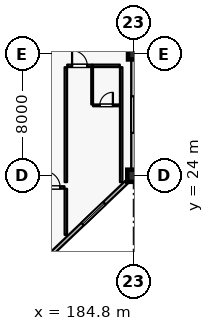
"""IFC4 building model, lengths in metres.
Left out: names, types, materials, properties, quantities, classifications, styles, units other than length and angle.
Written with IfcOpenShell. Run it as: python <this file> out.ifc"""

import sys

from ifc_helpers import new_model, si_unit, direction, frame, frame_2d, origin, origin_2d, place, context, subcontext, project, spatial, rectangle, extrude, element, fill, save


model = new_model("IFC4")
c1 = context("Model", 3, precision=1e-05, world=origin(), true_north=direction((0.0, 1.0)))
c2 = subcontext(c1, "Body", "Model", "MODEL_VIEW")
j1 = project(units=[si_unit("LENGTHUNIT", "METRE"), si_unit("PLANEANGLEUNIT", "RADIAN")], contexts=[c1])
p1 = place(None, origin())
s1 = spatial("IfcSite", under=j1, at=p1, CompositionType="ELEMENT")
p2 = place(p1, origin())
s2 = spatial("IfcBuilding", under=s1, at=p2, CompositionType="ELEMENT")
p3 = place(p2, frame((0.0, 0.0, 11.4)))
s3 = spatial("IfcBuildingStorey", under=s2, at=p3, CompositionType="ELEMENT", Elevation=11.4)
p4 = place(p3, frame((184.8, 24.0, 0.0), z_axis=(0.0, 0.0, 1.0), x_axis=(1.0, 0.0, 0.0)))
e1 = element("IfcColumn", 1, at=p4, inside=s3, PredefinedType="COLUMN", context=c2, shape_type="SweptSolid", body=[
    extrude(rectangle(XDim=0.8, YDim=0.8, at=origin_2d()), origin(), (0.0, 0.0, 1.0), 4.8),
])
p5 = place(p3, frame((184.8, 32.0, 0.0), z_axis=(0.0, 0.0, 1.0), x_axis=(1.0, 0.0, 0.0)))
e2 = element("IfcColumn", 2, at=p5, inside=s3, PredefinedType="COLUMN", context=c2, shape_type="SweptSolid", body=[
    extrude(rectangle(XDim=0.7, YDim=0.7, at=origin_2d()), origin(), (0.0, 0.0, 1.0), 4.8),
])
p6 = place(p3, frame((184.4, 23.619, 0.0), z_axis=(0.0, 0.0, 1.0), x_axis=(-0.724145676014, -0.689647040094, 0.0)))
e3 = element("IfcWall", 3, at=p6, inside=s3, PredefinedType="SOLIDWALL", context=c2, shape_type="SweptSolid", body=[
    extrude(rectangle(XDim=10.495, YDim=0.24, at=frame_2d((5.248, 0.0))), origin(), (0.0, 0.0, 1.0), 4.13),
])
p7 = place(p6, frame((2.066, 0.0, 0.8)))
e4 = element("IfcOpeningElement", 4, at=p7, cuts=e3, PredefinedType="OPENING", context=c2, shape_type="SweptSolid", body=[
    extrude(rectangle(XDim=2.0, YDim=1.75, at=frame_2d((1.0, 0.875))), frame((0.0, 0.13, 0.0), z_axis=(0.0, -1.0, 0.0), x_axis=(1.0, 0.0, 0.0)), (0.0, 0.0, 1.0), 0.26),
])
p8 = place(p6, frame((7.099, 0.0, 0.8)))
e5 = element("IfcOpeningElement", 5, at=p8, cuts=e3, PredefinedType="OPENING", context=c2, shape_type="SweptSolid", body=[
    extrude(rectangle(XDim=2.0, YDim=1.75, at=frame_2d((1.0, 0.875))), frame((0.0, 0.13, 0.0), z_axis=(0.0, -1.0, 0.0), x_axis=(1.0, 0.0, 0.0)), (0.0, 0.0, 1.0), 0.26),
])
p9 = place(p3, frame((184.8, 31.65, 0.0), z_axis=(0.0, 0.0, 1.0), x_axis=(0.0, -1.0, 0.0)))
e6 = element("IfcWall", 6, at=p9, inside=s3, PredefinedType="SOLIDWALL", context=c2, shape_type="SweptSolid", body=[
    extrude(rectangle(XDim=7.25, YDim=0.28, at=frame_2d((3.625, 0.0))), origin(), (0.0, 0.0, 1.0), 3.9),
])
p10 = place(p9, frame((2.425, 0.0, 0.75)))
e7 = element("IfcOpeningElement", 7, at=p10, cuts=e6, PredefinedType="OPENING", context=c2, shape_type="SweptSolid", body=[
    extrude(rectangle(XDim=2.4, YDim=1.65, at=frame_2d((1.2, 0.825))), frame((0.0, 0.15, 0.0), z_axis=(0.0, -1.0, 0.0), x_axis=(1.0, 0.0, 0.0)), (0.0, 0.0, 1.0), 0.3),
])
p11 = place(p3, frame((178.62, 23.23, 0.0), z_axis=(0.0, 0.0, 1.0), x_axis=(1.0, 0.0, 0.0)))
e8 = element("IfcWall", 8, at=p11, inside=s3, PredefinedType="PARTITIONING", context=c2, shape_type="SweptSolid", body=[
    extrude(rectangle(XDim=1.65, YDim=0.16, at=frame_2d((0.825, 0.0))), origin(), (0.0, 0.0, 1.0), 4.535),
])
p12 = place(p11, frame((0.285, 0.0, 0.0)))
e9 = element("IfcOpeningElement", 9, at=p12, cuts=e8, PredefinedType="OPENING", context=c2, shape_type="SweptSolid", body=[
    extrude(rectangle(XDim=1.08, YDim=2.3, at=frame_2d((0.54, 1.15))), frame((0.0, 0.09, 0.0), z_axis=(0.0, -1.0, 0.0), x_axis=(1.0, 0.0, 0.0)), (0.0, 0.0, 1.0), 0.18),
])
p13 = place(p3, frame((180.36, 20.11, 0.0), z_axis=(0.0, 0.0, 1.0), x_axis=(0.0, 1.0, 0.0)))
e10 = element("IfcWall", 10, at=p13, inside=s3, PredefinedType="PARTITIONING", context=c2, shape_type="SweptSolid", body=[
    extrude(rectangle(XDim=3.03, YDim=0.16, at=frame_2d((1.515, 0.0))), origin(), (0.0, 0.0, 1.0), 4.535),
])
p14 = place(p3, frame((180.45, 31.23, 0.0), z_axis=(0.0, 0.0, 1.0), x_axis=(1.0, 0.0, 0.0)))
e11 = element("IfcWall", 11, at=p14, inside=s3, PredefinedType="PARTITIONING", context=c2, shape_type="SweptSolid", body=[
    extrude(rectangle(XDim=1.64, YDim=0.16, at=frame_2d((0.82, 0.0))), origin(), (0.0, 0.0, 1.0), 4.535),
])
p15 = place(p14, frame((0.32, 0.0, 0.0)))
e12 = element("IfcOpeningElement", 12, at=p15, cuts=e11, PredefinedType="OPENING", context=c2, shape_type="SweptSolid", body=[
    extrude(rectangle(XDim=1.0, YDim=2.25, at=frame_2d((0.5, 1.125))), frame((0.0, 0.09, 0.0), z_axis=(0.0, -1.0, 0.0), x_axis=(1.0, 0.0, 0.0)), (0.0, 0.0, 1.0), 0.18),
])
p16 = place(p3, frame((182.1, 31.23, 0.0), z_axis=(0.0, 0.0, 1.0), x_axis=(1.0, 0.0, 0.0)))
e13 = element("IfcWall", 13, at=p16, inside=s3, PredefinedType="PARTITIONING", context=c2, shape_type="SweptSolid", body=[
    extrude(rectangle(XDim=1.81, YDim=0.16, at=frame_2d((0.905, 0.0))), origin(), (0.0, 0.0, 1.0), 4.535),
])
p17 = place(p3, frame((182.09, 28.69, 0.0), z_axis=(0.0, 0.0, 1.0), x_axis=(0.0, 1.0, 0.0)))
e14 = element("IfcWall", 14, at=p17, inside=s3, PredefinedType="PARTITIONING", context=c2, shape_type="SweptSolid", body=[
    extrude(rectangle(XDim=2.45, YDim=0.115, at=frame_2d((1.225, 0.0))), origin(), (0.0, 0.0, 1.0), 4.535),
])
p18 = place(p3, frame((182.15, 28.63, 0.0), z_axis=(0.0, 0.0, 1.0), x_axis=(1.0, 0.0, 0.0)))
e15 = element("IfcWall", 15, at=p18, inside=s3, PredefinedType="PARTITIONING", context=c2, shape_type="SweptSolid", body=[
    extrude(rectangle(XDim=1.75, YDim=0.115, at=frame_2d((0.875, 0.0))), origin(), (0.0, 0.0, 1.0), 4.535),
])
p19 = place(p18, frame((0.445, 0.0, 0.0)))
e16 = element("IfcOpeningElement", 16, at=p19, cuts=e15, PredefinedType="OPENING", context=c2, shape_type="SweptSolid", body=[
    extrude(rectangle(XDim=0.86, YDim=2.12, at=frame_2d((0.43, 1.06))), frame((0.0, 0.067, 0.0), z_axis=(0.0, -1.0, 0.0), x_axis=(1.0, 0.0, 0.0)), (0.0, 0.0, 1.0), 0.135),
])
for number, where, z_axis, x_axis in (
    (17, (180.36, 23.58, 0.0), (0.0, 0.0, 1.0), (0.0, 1.0, 0.0)),
    (18, (184.0, 23.58, 0.0), (0.0, 0.0, 1.0), (0.0, 1.0, 0.0)),
):
    element("IfcWall", number, at=place(p3, frame(where, z_axis=z_axis, x_axis=x_axis)), inside=s3, PredefinedType="PARTITIONING", context=c2, shape_type="SweptSolid", body=[
        extrude(rectangle(XDim=7.56, YDim=0.16, at=frame_2d((3.78, 0.0))), origin(), (0.0, 0.0, 1.0), 4.535),
    ])
p20 = place(p7, origin())
e19 = element("IfcWindow", 19, at=p20, inside=s3, PartitioningType="DOUBLE_PANEL_VERTICAL", PredefinedType="WINDOW", context=c2, shape_type="SweptSolid", body=[
    extrude(rectangle(XDim=2.0, YDim=1.75, at=frame_2d((1.0, 0.875))), frame((0.0, 0.03, 0.0), z_axis=(0.0, -1.0, 0.0), x_axis=(1.0, 0.0, 0.0)), (0.0, 0.0, 1.0), 0.06),
])
fill(e4, e19)
p21 = place(p10, origin())
e20 = element("IfcWindow", 20, at=p21, inside=s3, PartitioningType="DOUBLE_PANEL_VERTICAL", PredefinedType="WINDOW", context=c2, shape_type="SweptSolid", body=[
    extrude(rectangle(XDim=2.4, YDim=1.65, at=frame_2d((1.2, 0.825))), frame((0.0, 0.03, 0.0), z_axis=(0.0, -1.0, 0.0), x_axis=(1.0, 0.0, 0.0)), (0.0, 0.0, 1.0), 0.06),
])
fill(e7, e20)
p22 = place(p12, origin())
e21 = element("IfcDoor", 21, at=p22, inside=s3, OperationType="SINGLE_SWING_LEFT", PredefinedType="DOOR", context=c2, shape_type="SweptSolid", body=[
    extrude(rectangle(XDim=1.08, YDim=2.3, at=frame_2d((0.54, 1.15))), frame((0.0, 0.025, 0.0), z_axis=(0.0, -1.0, 0.0), x_axis=(1.0, 0.0, 0.0)), (0.0, 0.0, 1.0), 0.05),
])
fill(e9, e21)
p23 = place(p15, origin())
e22 = element("IfcDoor", 22, at=p23, inside=s3, OperationType="SINGLE_SWING_LEFT", PredefinedType="DOOR", context=c2, shape_type="SweptSolid", body=[
    extrude(rectangle(XDim=1.0, YDim=2.25, at=frame_2d((0.5, 1.125))), frame((0.0, 0.025, 0.0), z_axis=(0.0, -1.0, 0.0), x_axis=(1.0, 0.0, 0.0)), (0.0, 0.0, 1.0), 0.05),
])
fill(e12, e22)
p24 = place(p19, origin())
e23 = element("IfcDoor", 23, at=p24, inside=s3, OperationType="SINGLE_SWING_RIGHT", PredefinedType="DOOR", context=c2, shape_type="SweptSolid", body=[
    extrude(rectangle(XDim=0.86, YDim=2.12, at=frame_2d((0.43, 1.06))), frame((0.0, 0.025, 0.0), z_axis=(0.0, -1.0, 0.0), x_axis=(1.0, 0.0, 0.0)), (0.0, 0.0, 1.0), 0.05),
])
fill(e16, e23)
save(model, sys.argv[1])
